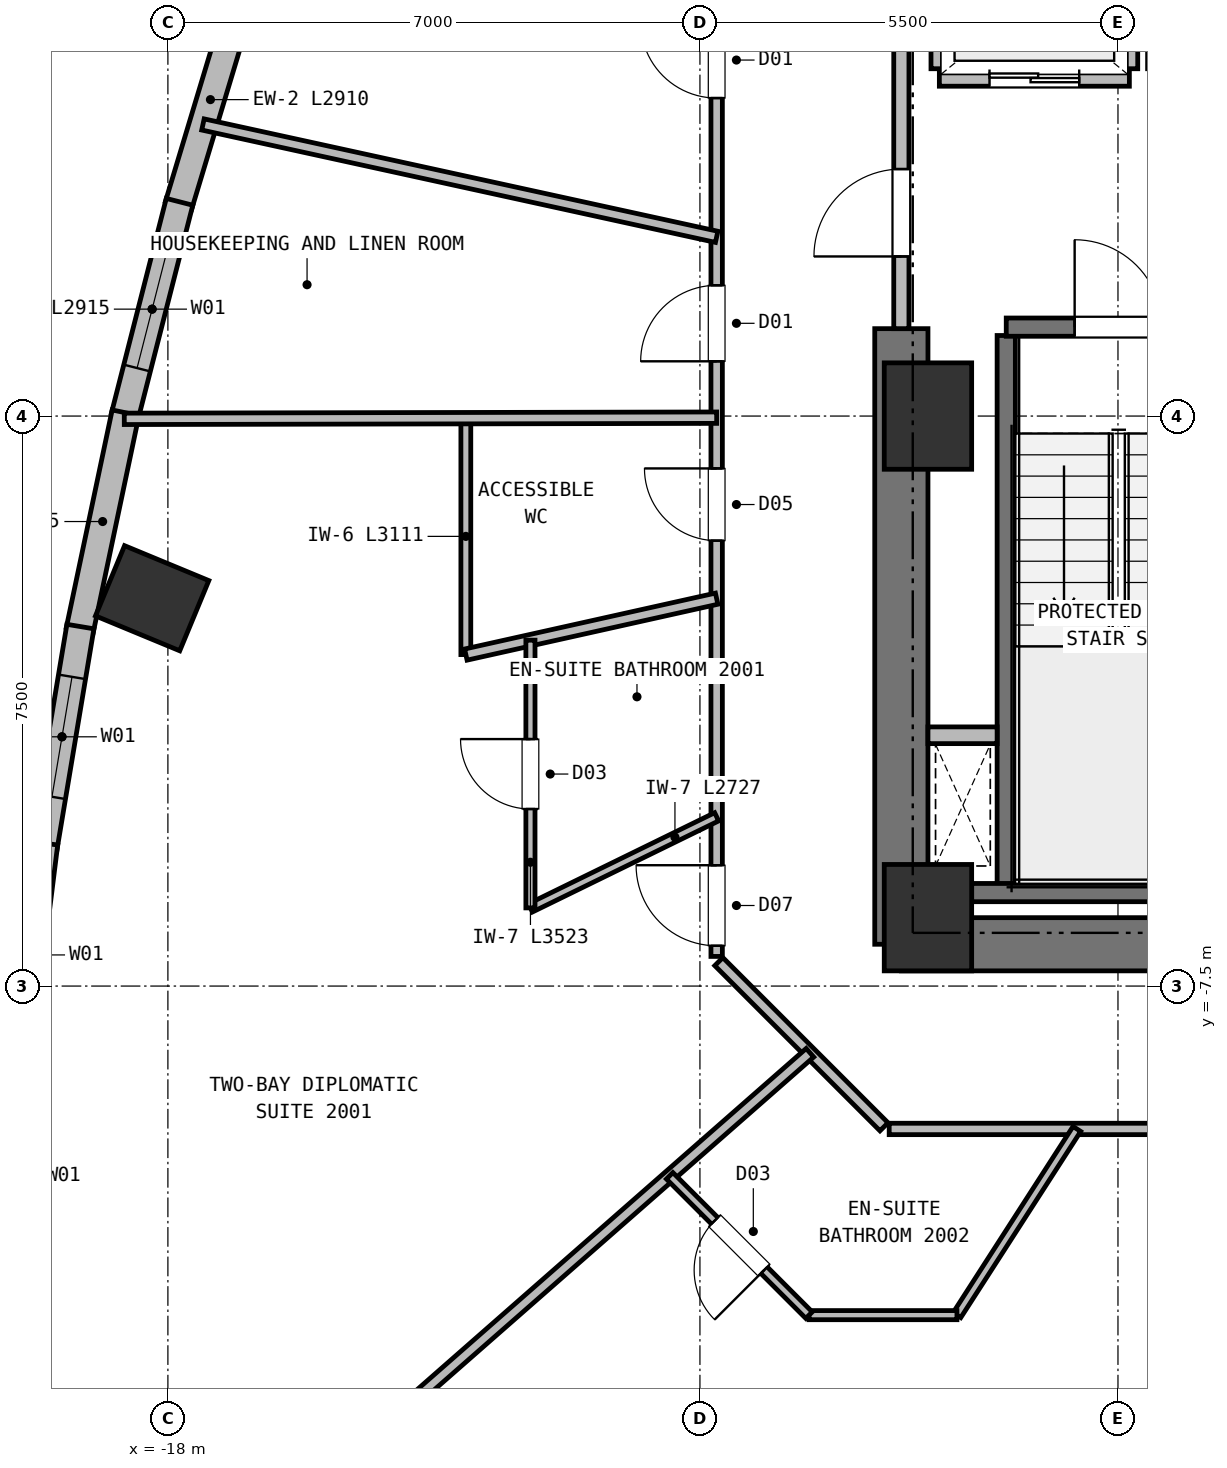
"""IFC4 building model, lengths in metres.
Left out: names, types, materials, properties, quantities, classifications, styles, units other than length and angle.
Written with IfcOpenShell. Run it as: python <this file> out.ifc"""

import sys

from ifc_helpers import new_model, si_unit, direction, frame, frame_2d, origin, origin_2d, place, context, subcontext, project, spatial, rectangle, extrude, element, fill, save


model = new_model("IFC4")
c1 = context("Model", 3, precision=1e-05, world=origin(), true_north=direction((0.0, 1.0)))
c2 = subcontext(c1, "Body", "Model", "MODEL_VIEW")
j1 = project(units=[si_unit("LENGTHUNIT", "METRE"), si_unit("PLANEANGLEUNIT", "RADIAN")], contexts=[c1])
p1 = place(None, origin())
s1 = spatial("IfcSite", under=j1, at=p1, CompositionType="ELEMENT")
p2 = place(p1, origin())
s2 = spatial("IfcBuilding", under=s1, at=p2, CompositionType="ELEMENT")
p3 = place(p2, frame((0.0, 0.0, 71.75)))
s3 = spatial("IfcBuildingStorey", under=s2, at=p3, CompositionType="ELEMENT", Elevation=71.75)
for number, where, z_axis, x_axis in (
    (1, (-8.0, -6.6, 0.0), (0.0, 0.0, 1.0), (1.0, 0.0, 0.0)),
    (2, (-8.0, 0.0, 0.0), (0.0, 0.0, 1.0), (1.0, 0.0, 0.0)),
):
    element("IfcColumn", number, at=place(p3, frame(where, z_axis=z_axis, x_axis=x_axis)), inside=s3, PredefinedType="COLUMN", context=c2, shape_type="SweptSolid", body=[
        extrude(rectangle(XDim=1.15, YDim=1.4, at=origin_2d()), origin(), (0.0, 0.0, 1.0), 3.75),
    ])
p4 = place(p3, frame((-8.35, -6.95, 0.0), z_axis=(0.0, 0.0, 1.0), x_axis=(1.0, 0.0, 0.0)))
e3 = element("IfcWall", 3, at=p4, inside=s3, PredefinedType="SHEAR", context=c2, shape_type="SweptSolid", body=[
    extrude(rectangle(XDim=3.95, YDim=0.7, at=frame_2d((1.975, 0.0))), origin(), (0.0, 0.0, 1.0), 3.5),
])
p5 = place(p3, frame((-8.35, -6.95, 0.0), z_axis=(0.0, 0.0, 1.0), x_axis=(0.0, 1.0, 0.0)))
e4 = element("IfcWall", 4, at=p5, inside=s3, PredefinedType="SHEAR", context=c2, shape_type="SweptSolid", body=[
    extrude(rectangle(XDim=8.1, YDim=0.7, at=frame_2d((4.05, 0.0))), origin(), (0.0, 0.0, 1.0), 3.5),
])
p6 = place(p3, frame((-18.207, -2.397, 0.0), z_axis=(0.0, 0.0, 1.0), x_axis=(0.382683432365, 0.923879532511, 0.0)))
e5 = element("IfcColumn", 5, at=p6, inside=s3, PredefinedType="COLUMN", context=c2, shape_type="SweptSolid", body=[
    extrude(rectangle(XDim=1.0, YDim=1.2, at=origin_2d()), origin(), (0.0, 0.0, 1.0), 3.75),
])
p7 = place(p3, frame((-17.86, 2.771, 0.0), z_axis=(0.0, 0.0, 1.0), x_axis=(0.288579409527, 0.95745596473, 0.0)))
e6 = element("IfcWall", 6, at=p7, inside=s3, PredefinedType="SOLIDWALL", context=c2, shape_type="SweptSolid", body=[
    extrude(rectangle(XDim=2.909, YDim=0.36, at=frame_2d((1.455, 0.0))), origin(), (0.0, 0.0, 1.0), 3.5),
])
p8 = place(p3, frame((-18.568, -0.005, 0.0), z_axis=(0.0, 0.0, 1.0), x_axis=(0.247577302221, 0.968868143467, 0.0)))
e7 = element("IfcWall", 7, at=p8, inside=s3, PredefinedType="SOLIDWALL", context=c2, shape_type="SweptSolid", body=[
    extrude(rectangle(XDim=2.915, YDim=0.36, at=frame_2d((1.458, 0.0))), origin(), (0.0, 0.0, 1.0), 3.5),
])
p9 = place(p8, frame((0.657, 0.0, 0.72)))
e8 = element("IfcOpeningElement", 8, at=p9, cuts=e7, PredefinedType="OPENING", context=c2, shape_type="SweptSolid", body=[
    extrude(rectangle(XDim=1.6, YDim=1.88, at=frame_2d((0.8, 0.94))), frame((0.0, 0.19, 0.0), z_axis=(0.0, -1.0, 0.0), x_axis=(1.0, 0.0, 0.0)), (0.0, 0.0, 1.0), 0.38),
])
p10 = place(p3, frame((-19.16, -2.819, 0.0), z_axis=(0.0, 0.0, 1.0), x_axis=(0.206216567534, 0.978506375694, 0.0)))
e9 = element("IfcWall", 9, at=p10, inside=s3, PredefinedType="SOLIDWALL", context=c2, shape_type="SweptSolid", body=[
    extrude(rectangle(XDim=2.926, YDim=0.36, at=frame_2d((1.463, 0.0))), origin(), (0.0, 0.0, 1.0), 3.5),
])
p11 = place(p3, frame((-19.636, -5.671, 0.0), z_axis=(0.0, 0.0, 1.0), x_axis=(0.164870141486, 0.986315282476, 0.0)))
e10 = element("IfcWall", 10, at=p11, inside=s3, PredefinedType="SOLIDWALL", context=c2, shape_type="SweptSolid", body=[
    extrude(rectangle(XDim=2.941, YDim=0.36, at=frame_2d((1.47, 0.0))), origin(), (0.0, 0.0, 1.0), 3.5),
])
p12 = place(p11, frame((0.67, 0.0, 0.72)))
e11 = element("IfcOpeningElement", 11, at=p12, cuts=e10, PredefinedType="OPENING", context=c2, shape_type="SweptSolid", body=[
    extrude(rectangle(XDim=1.6, YDim=1.88, at=frame_2d((0.8, 0.94))), frame((0.0, 0.19, 0.0), z_axis=(0.0, -1.0, 0.0), x_axis=(1.0, 0.0, 0.0)), (0.0, 0.0, 1.0), 0.38),
])
p13 = place(p3, frame((-19.995, -8.56, 0.0), z_axis=(0.0, 0.0, 1.0), x_axis=(0.123740486397, 0.99231461343, 0.0)))
e12 = element("IfcWall", 12, at=p13, inside=s3, PredefinedType="SOLIDWALL", context=c2, shape_type="SweptSolid", body=[
    extrude(rectangle(XDim=2.961, YDim=0.36, at=frame_2d((1.481, 0.0))), origin(), (0.0, 0.0, 1.0), 3.5),
])
p14 = place(p13, frame((0.681, 0.0, 0.72)))
e13 = element("IfcOpeningElement", 13, at=p14, cuts=e12, PredefinedType="OPENING", context=c2, shape_type="SweptSolid", body=[
    extrude(rectangle(XDim=1.6, YDim=1.88, at=frame_2d((0.8, 0.94))), frame((0.0, 0.19, 0.0), z_axis=(0.0, -1.0, 0.0), x_axis=(1.0, 0.0, 0.0)), (0.0, 0.0, 1.0), 0.38),
])
p15 = place(p3, frame((-6.97, -6.16, 0.0), z_axis=(0.0, 0.0, 1.0), x_axis=(0.0, 1.0, 0.0)))
e14 = element("IfcWall", 14, at=p15, inside=s3, PredefinedType="SHEAR", context=c2, shape_type="SweptSolid", body=[
    extrude(rectangle(XDim=7.22, YDim=0.24, at=frame_2d((3.61, 0.0))), origin(), (0.0, 0.0, 1.0), 3.5),
])
p16 = place(p3, frame((-7.425, -6.27, 0.0), z_axis=(0.0, 0.0, 1.0), x_axis=(1.0, 0.0, 0.0)))
e15 = element("IfcWall", 15, at=p16, inside=s3, PredefinedType="SHEAR", context=c2, shape_type="SweptSolid", body=[
    extrude(rectangle(XDim=3.415, YDim=0.24, at=frame_2d((1.708, 0.0))), origin(), (0.0, 0.0, 1.0), 3.5),
])
p17 = place(p3, frame((-6.97, 1.17, 0.0), z_axis=(0.0, 0.0, 1.0), x_axis=(1.0, 0.0, 0.0)))
e16 = element("IfcWall", 16, at=p17, inside=s3, PredefinedType="SHEAR", context=c2, shape_type="SweptSolid", body=[
    extrude(rectangle(XDim=2.96, YDim=0.24, at=frame_2d((1.48, 0.0))), origin(), (0.0, 0.0, 1.0), 3.5),
])
p18 = place(p17, frame((0.9, 0.0, 0.0)))
e17 = element("IfcOpeningElement", 17, at=p18, cuts=e16, PredefinedType="OPENING", context=c2, shape_type="SweptSolid", body=[
    extrude(rectangle(XDim=1.15, YDim=2.15, at=frame_2d((0.575, 1.075))), frame((0.0, 0.13, 0.0), z_axis=(0.0, -1.0, 0.0), x_axis=(1.0, 0.0, 0.0)), (0.0, 0.0, 1.0), 0.26),
])
p19 = place(p3, frame((-8.0, -4.2, 0.0), z_axis=(0.0, 0.0, 1.0), x_axis=(1.0, 0.0, 0.0)))
e18 = element("IfcWall", 18, at=p19, inside=s3, PredefinedType="PARTITIONING", context=c2, shape_type="SweptSolid", body=[
    extrude(rectangle(XDim=0.91, YDim=0.22, at=frame_2d((0.455, 0.0))), origin(), (0.0, 0.0, 1.0), 3.5),
])
p20 = place(p3, frame((-7.85, 4.45, 0.0), z_axis=(0.0, 0.0, 1.0), x_axis=(1.0, 0.0, 0.0)))
e19 = element("IfcWall", 19, at=p20, inside=s3, PredefinedType="PARTITIONING", context=c2, shape_type="SweptSolid", body=[
    extrude(rectangle(XDim=2.5, YDim=0.22, at=frame_2d((1.25, 0.0))), origin(), (0.0, 0.0, 1.0), 3.5),
])
p21 = place(p20, frame((0.66, 0.0, 0.0)))
e20 = element("IfcOpeningElement", 20, at=p21, cuts=e19, PredefinedType="OPENING", context=c2, shape_type="SweptSolid", body=[
    extrude(rectangle(XDim=1.18, YDim=2.15, at=frame_2d((0.59, 1.075))), frame((0.0, 0.12, 0.0), z_axis=(0.0, -1.0, 0.0), x_axis=(1.0, 0.0, 0.0)), (0.0, 0.0, 1.0), 0.24),
])
p22 = place(p3, frame((-7.85, 4.57, 0.0), z_axis=(0.0, 0.0, 1.0), x_axis=(0.0, 1.0, 0.0)))
e21 = element("IfcWall", 21, at=p22, inside=s3, PredefinedType="PARTITIONING", context=c2, shape_type="SweptSolid", body=[
    extrude(rectangle(XDim=2.03, YDim=0.22, at=frame_2d((1.015, 0.0))), origin(), (0.0, 0.0, 1.0), 3.08),
])
p23 = place(p3, frame((-5.35, 4.57, 0.0), z_axis=(0.0, 0.0, 1.0), x_axis=(0.0, 1.0, 0.0)))
e22 = element("IfcWall", 22, at=p23, inside=s3, PredefinedType="PARTITIONING", context=c2, shape_type="SweptSolid", body=[
    extrude(rectangle(XDim=2.03, YDim=0.22, at=frame_2d((1.015, 0.0))), origin(), (0.0, 0.0, 1.0), 3.5),
])
p24 = place(p3, frame((-8.35, 1.15, 0.0), z_axis=(0.0, 0.0, 1.0), x_axis=(0.0, 1.0, 0.0)))
e23 = element("IfcWall", 23, at=p24, inside=s3, PredefinedType="PARTITIONING", context=c2, shape_type="SweptSolid", body=[
    extrude(rectangle(XDim=5.4, YDim=0.2, at=frame_2d((2.7, 0.0))), origin(), (0.0, 0.0, 1.0), 3.5),
])
p25 = place(p24, frame((0.95, 0.0, 0.0)))
e24 = element("IfcOpeningElement", 24, at=p25, cuts=e23, PredefinedType="OPENING", context=c2, shape_type="SweptSolid", body=[
    extrude(rectangle(XDim=1.15, YDim=2.15, at=frame_2d((0.575, 1.075))), frame((0.0, 0.11, 0.0), z_axis=(0.0, -1.0, 0.0), x_axis=(1.0, 0.0, 0.0)), (0.0, 0.0, 1.0), 0.22),
])
p26 = place(p3, frame((8.51, -9.38, 0.0), z_axis=(0.0, 0.0, 1.0), x_axis=(-1.0, 0.0, 0.0)))
e25 = element("IfcWall", 25, at=p26, inside=s3, PredefinedType="PARTITIONING", context=c2, shape_type="SweptSolid", body=[
    extrude(rectangle(XDim=17.02, YDim=0.15, at=frame_2d((8.51, 0.0))), origin(), (0.0, 0.0, 1.0), 3.5),
])
p27 = place(p26, frame((5.815, 0.0, 0.0)))
e26 = element("IfcOpeningElement", 26, at=p27, cuts=e25, PredefinedType="OPENING", context=c2, shape_type="SweptSolid", body=[
    extrude(rectangle(XDim=1.0, YDim=2.15, at=frame_2d((0.5, 1.075))), frame((0.0, 0.085, 0.0), z_axis=(0.0, -1.0, 0.0), x_axis=(1.0, 0.0, 0.0)), (0.0, 0.0, 1.0), 0.17),
])
p28 = place(p26, frame((12.238, 0.0, 0.0)))
e27 = element("IfcOpeningElement", 27, at=p28, cuts=e25, PredefinedType="OPENING", context=c2, shape_type="SweptSolid", body=[
    extrude(rectangle(XDim=1.06, YDim=2.15, at=frame_2d((0.53, 1.075))), frame((0.0, 0.085, 0.0), z_axis=(0.0, -1.0, 0.0), x_axis=(1.0, 0.0, 0.0)), (0.0, 0.0, 1.0), 0.17),
])
p29 = place(p3, frame((-10.78, -7.11, 0.0), z_axis=(0.0, 0.0, 1.0), x_axis=(0.0, 1.0, 0.0)))
e28 = element("IfcWall", 28, at=p29, inside=s3, PredefinedType="PARTITIONING", context=c2, shape_type="SweptSolid", body=[
    extrude(rectangle(XDim=14.22, YDim=0.15, at=frame_2d((7.11, 0.0))), origin(), (0.0, 0.0, 1.0), 3.12),
])
p30 = place(p29, frame((5.471, 0.0, 0.0)))
e29 = element("IfcOpeningElement", 29, at=p30, cuts=e28, PredefinedType="OPENING", context=c2, shape_type="SweptSolid", body=[
    extrude(rectangle(XDim=0.95, YDim=2.1, at=frame_2d((0.475, 1.05))), frame((0.0, 0.085, 0.0), z_axis=(0.0, -1.0, 0.0), x_axis=(1.0, 0.0, 0.0)), (0.0, 0.0, 1.0), 0.17),
])
p31 = place(p29, frame((7.83, 0.0, 0.0)))
e30 = element("IfcOpeningElement", 30, at=p31, cuts=e28, PredefinedType="OPENING", context=c2, shape_type="SweptSolid", body=[
    extrude(rectangle(XDim=1.0, YDim=2.15, at=frame_2d((0.5, 1.075))), frame((0.0, 0.085, 0.0), z_axis=(0.0, -1.0, 0.0), x_axis=(1.0, 0.0, 0.0)), (0.0, 0.0, 1.0), 0.17),
])
p32 = place(p29, frame((11.294, 0.0, 0.0)))
e31 = element("IfcOpeningElement", 31, at=p32, cuts=e28, PredefinedType="OPENING", context=c2, shape_type="SweptSolid", body=[
    extrude(rectangle(XDim=1.0, YDim=2.15, at=frame_2d((0.5, 1.075))), frame((0.0, 0.085, 0.0), z_axis=(0.0, -1.0, 0.0), x_axis=(1.0, 0.0, 0.0)), (0.0, 0.0, 1.0), 0.17),
])
p33 = place(p29, frame((0.14, 0.0, 0.0)))
e32 = element("IfcOpeningElement", 32, at=p33, cuts=e28, PredefinedType="OPENING", context=c2, shape_type="SweptSolid", body=[
    extrude(rectangle(XDim=1.06, YDim=2.15, at=frame_2d((0.53, 1.075))), frame((0.0, 0.085, 0.0), z_axis=(0.0, -1.0, 0.0), x_axis=(1.0, 0.0, 0.0)), (0.0, 0.0, 1.0), 0.17),
])
p34 = place(p3, frame((-8.578, -9.352, 0.0), z_axis=(0.0, 0.0, 1.0), x_axis=(-0.707067066127, 0.707146494016, 0.0)))
e33 = element("IfcWall", 33, at=p34, inside=s3, PredefinedType="PARTITIONING", context=c2, shape_type="SweptSolid", body=[
    extrude(rectangle(XDim=3.074, YDim=0.15, at=frame_2d((1.537, 0.0))), origin(), (0.0, 0.0, 1.0), 3.5),
])
p35 = place(p3, frame((-14.08, -3.138, 0.0), z_axis=(0.0, 0.0, 1.0), x_axis=(0.0, 1.0, 0.0)))
e34 = element("IfcWall", 34, at=p35, inside=s3, PredefinedType="PARTITIONING", context=c2, shape_type="SweptSolid", body=[
    extrude(rectangle(XDim=3.111, YDim=0.13, at=frame_2d((1.555, 0.0))), origin(), (0.0, 0.0, 1.0), 3.5),
])
p36 = place(p3, frame((-10.78, -2.403, 0.0), z_axis=(0.0, 0.0, 1.0), x_axis=(-0.976045834457, -0.217564999572, 0.0)))
e35 = element("IfcWall", 35, at=p36, inside=s3, PredefinedType="PARTITIONING", context=c2, shape_type="SweptSolid", body=[
    extrude(rectangle(XDim=3.381, YDim=0.15, at=frame_2d((1.69, 0.0))), origin(), (0.0, 0.0, 1.0), 3.5),
])
p37 = place(p3, frame((-10.78, -5.273, 0.0), z_axis=(0.0, 0.0, 1.0), x_axis=(-0.898278372968, -0.439426859282, 0.0)))
e36 = element("IfcWall", 36, at=p37, inside=s3, PredefinedType="PARTITIONING", context=c2, shape_type="SweptSolid", body=[
    extrude(rectangle(XDim=2.727, YDim=0.12, at=frame_2d((1.364, 0.0))), origin(), (0.0, 0.0, 1.0), 3.5),
])
p38 = place(p3, frame((-13.23, -6.472, 0.0), z_axis=(0.0, 0.0, 1.0), x_axis=(0.0, 1.0, 0.0)))
e37 = element("IfcWall", 37, at=p38, inside=s3, PredefinedType="PARTITIONING", context=c2, shape_type="SweptSolid", body=[
    extrude(rectangle(XDim=3.523, YDim=0.12, at=frame_2d((1.761, 0.0))), origin(), (0.0, 0.0, 1.0), 3.12),
])
p39 = place(p38, frame((1.301, 0.0, 0.0)))
e38 = element("IfcOpeningElement", 38, at=p39, cuts=e37, PredefinedType="OPENING", context=c2, shape_type="SweptSolid", body=[
    extrude(rectangle(XDim=0.92, YDim=2.1, at=frame_2d((0.46, 1.05))), frame((0.0, 0.07, 0.0), z_axis=(0.0, -1.0, 0.0), x_axis=(1.0, 0.0, 0.0)), (0.0, 0.0, 1.0), 0.14),
])
p40 = place(p3, frame((-9.552, -8.377, 0.0), z_axis=(0.0, 0.0, 1.0), x_axis=(-0.751837697968, -0.659348220529, 0.0)))
e39 = element("IfcWall", 39, at=p40, inside=s3, PredefinedType="PARTITIONING", context=c2, shape_type="SweptSolid", body=[
    extrude(rectangle(XDim=12.86, YDim=0.15, at=frame_2d((6.43, 0.0))), origin(), (0.0, 0.0, 1.0), 3.5),
])
p41 = place(p3, frame((-7.619, -11.83, 0.0), z_axis=(0.0, 0.0, 1.0), x_axis=(0.541367176674, 0.840786286769, 0.0)))
e40 = element("IfcWall", 40, at=p41, inside=s3, PredefinedType="PARTITIONING", context=c2, shape_type="SweptSolid", body=[
    extrude(rectangle(XDim=2.914, YDim=0.12, at=frame_2d((1.457, 0.0))), origin(), (0.0, 0.0, 1.0), 3.5),
])
p42 = place(p3, frame((-7.619, -11.83, 0.0), z_axis=(0.0, 0.0, 1.0), x_axis=(-1.0, 0.0, 0.0)))
e41 = element("IfcWall", 41, at=p42, inside=s3, PredefinedType="PARTITIONING", context=c2, shape_type="SweptSolid", body=[
    extrude(rectangle(XDim=1.946, YDim=0.12, at=frame_2d((0.973, 0.0))), origin(), (0.0, 0.0, 1.0), 3.5),
])
p43 = place(p3, frame((-9.565, -11.83, 0.0), z_axis=(0.0, 0.0, 1.0), x_axis=(-0.707106781187, 0.707106781187, 0.0)))
e42 = element("IfcWall", 42, at=p43, inside=s3, PredefinedType="PARTITIONING", context=c2, shape_type="SweptSolid", body=[
    extrude(rectangle(XDim=2.593, YDim=0.12, at=frame_2d((1.297, 0.0))), origin(), (0.0, 0.0, 1.0), 3.5),
])
p44 = place(p43, frame((0.837, 0.0, 0.0)))
e43 = element("IfcOpeningElement", 43, at=p44, cuts=e42, PredefinedType="OPENING", context=c2, shape_type="SweptSolid", body=[
    extrude(rectangle(XDim=0.92, YDim=2.1, at=frame_2d((0.46, 1.05))), frame((0.0, 0.07, 0.0), z_axis=(0.0, -1.0, 0.0), x_axis=(1.0, 0.0, 0.0)), (0.0, 0.0, 1.0), 0.14),
])
p45 = place(p3, frame((-10.78, 2.358, 0.0), z_axis=(0.0, 0.0, 1.0), x_axis=(-0.97689172926, 0.213734763911, 0.0)))
e44 = element("IfcWall", 44, at=p45, inside=s3, PredefinedType="PARTITIONING", context=c2, shape_type="SweptSolid", body=[
    extrude(rectangle(XDim=6.919, YDim=0.15, at=frame_2d((3.459, 0.0))), origin(), (0.0, 0.0, 1.0), 3.5),
])
p46 = place(p3, frame((-10.78, -0.021, 0.0), z_axis=(0.0, 0.0, 1.0), x_axis=(-0.999998052657, -0.001973494888, 0.0)))
e45 = element("IfcWall", 45, at=p46, inside=s3, PredefinedType="PARTITIONING", context=c2, shape_type="SweptSolid", body=[
    extrude(rectangle(XDim=7.794, YDim=0.15, at=frame_2d((3.897, 0.0))), origin(), (0.0, 0.0, 1.0), 3.5),
])
p47 = place(p9, origin())
e46 = element("IfcWindow", 46, at=p47, inside=s3, PartitioningType="SINGLE_PANEL", PredefinedType="WINDOW", context=c2, shape_type="SweptSolid", body=[
    extrude(rectangle(XDim=1.6, YDim=1.88, at=frame_2d((0.8, 0.94))), frame((0.0, 0.03, 0.0), z_axis=(0.0, -1.0, 0.0), x_axis=(1.0, 0.0, 0.0)), (0.0, 0.0, 1.0), 0.06),
])
fill(e8, e46)
p48 = place(p12, origin())
e47 = element("IfcWindow", 47, at=p48, inside=s3, PartitioningType="SINGLE_PANEL", PredefinedType="WINDOW", context=c2, shape_type="SweptSolid", body=[
    extrude(rectangle(XDim=1.6, YDim=1.88, at=frame_2d((0.8, 0.94))), frame((0.0, 0.03, 0.0), z_axis=(0.0, -1.0, 0.0), x_axis=(1.0, 0.0, 0.0)), (0.0, 0.0, 1.0), 0.06),
])
fill(e11, e47)
p49 = place(p18, origin())
e48 = element("IfcDoor", 48, at=p49, inside=s3, OperationType="SINGLE_SWING_LEFT", PredefinedType="DOOR", context=c2, shape_type="SweptSolid", body=[
    extrude(rectangle(XDim=1.15, YDim=2.15, at=frame_2d((0.575, 1.075))), frame((0.0, 0.025, 0.0), z_axis=(0.0, -1.0, 0.0), x_axis=(1.0, 0.0, 0.0)), (0.0, 0.0, 1.0), 0.05),
])
fill(e17, e48)
p50 = place(p21, origin())
e49 = element("IfcDoor", 49, at=p50, inside=s3, OperationType="DOUBLE_DOOR_SLIDING", PredefinedType="DOOR", context=c2, shape_type="SweptSolid", body=[
    extrude(rectangle(XDim=1.18, YDim=2.15, at=frame_2d((0.59, 1.075))), frame((0.0, 0.025, 0.0), z_axis=(0.0, -1.0, 0.0), x_axis=(1.0, 0.0, 0.0)), (0.0, 0.0, 1.0), 0.05),
])
fill(e20, e49)
p51 = place(p25, origin())
e50 = element("IfcDoor", 50, at=p51, inside=s3, OperationType="SINGLE_SWING_LEFT", PredefinedType="DOOR", context=c2, shape_type="SweptSolid", body=[
    extrude(rectangle(XDim=1.15, YDim=2.15, at=frame_2d((0.575, 1.075))), frame((0.0, 0.025, 0.0), z_axis=(0.0, -1.0, 0.0), x_axis=(1.0, 0.0, 0.0)), (0.0, 0.0, 1.0), 0.05),
])
fill(e24, e50)
p52 = place(p39, origin())
e51 = element("IfcDoor", 51, at=p52, inside=s3, OperationType="SINGLE_SWING_RIGHT", PredefinedType="DOOR", context=c2, shape_type="SweptSolid", body=[
    extrude(rectangle(XDim=0.92, YDim=2.1, at=frame_2d((0.46, 1.05))), frame((0.0, 0.025, 0.0), z_axis=(0.0, -1.0, 0.0), x_axis=(1.0, 0.0, 0.0)), (0.0, 0.0, 1.0), 0.05),
])
fill(e38, e51)
p53 = place(p44, origin())
e52 = element("IfcDoor", 52, at=p53, inside=s3, OperationType="SINGLE_SWING_LEFT", PredefinedType="DOOR", context=c2, shape_type="SweptSolid", body=[
    extrude(rectangle(XDim=0.92, YDim=2.1, at=frame_2d((0.46, 1.05))), frame((0.0, 0.025, 0.0), z_axis=(0.0, -1.0, 0.0), x_axis=(1.0, 0.0, 0.0)), (0.0, 0.0, 1.0), 0.05),
])
fill(e43, e52)
p54 = place(p30, origin())
e53 = element("IfcDoor", 53, at=p54, inside=s3, OperationType="SINGLE_SWING_RIGHT", PredefinedType="DOOR", context=c2, shape_type="SweptSolid", body=[
    extrude(rectangle(XDim=0.95, YDim=2.1, at=frame_2d((0.475, 1.05))), frame((0.0, 0.025, 0.0), z_axis=(0.0, -1.0, 0.0), x_axis=(1.0, 0.0, 0.0)), (0.0, 0.0, 1.0), 0.05),
])
fill(e29, e53)
p55 = place(p31, origin())
e54 = element("IfcDoor", 54, at=p55, inside=s3, OperationType="SINGLE_SWING_LEFT", PredefinedType="DOOR", context=c2, shape_type="SweptSolid", body=[
    extrude(rectangle(XDim=1.0, YDim=2.15, at=frame_2d((0.5, 1.075))), frame((0.0, 0.025, 0.0), z_axis=(0.0, -1.0, 0.0), x_axis=(1.0, 0.0, 0.0)), (0.0, 0.0, 1.0), 0.05),
])
fill(e30, e54)
p56 = place(p32, origin())
e55 = element("IfcDoor", 55, at=p56, inside=s3, OperationType="SINGLE_SWING_RIGHT", PredefinedType="DOOR", context=c2, shape_type="SweptSolid", body=[
    extrude(rectangle(XDim=1.0, YDim=2.15, at=frame_2d((0.5, 1.075))), frame((0.0, 0.025, 0.0), z_axis=(0.0, -1.0, 0.0), x_axis=(1.0, 0.0, 0.0)), (0.0, 0.0, 1.0), 0.05),
])
fill(e31, e55)
p57 = place(p33, origin())
e56 = element("IfcDoor", 56, at=p57, inside=s3, OperationType="SINGLE_SWING_RIGHT", PredefinedType="DOOR", context=c2, shape_type="SweptSolid", body=[
    extrude(rectangle(XDim=1.06, YDim=2.15, at=frame_2d((0.53, 1.075))), frame((0.0, 0.025, 0.0), z_axis=(0.0, -1.0, 0.0), x_axis=(1.0, 0.0, 0.0)), (0.0, 0.0, 1.0), 0.05),
])
fill(e32, e56)
save(model, sys.argv[1])
